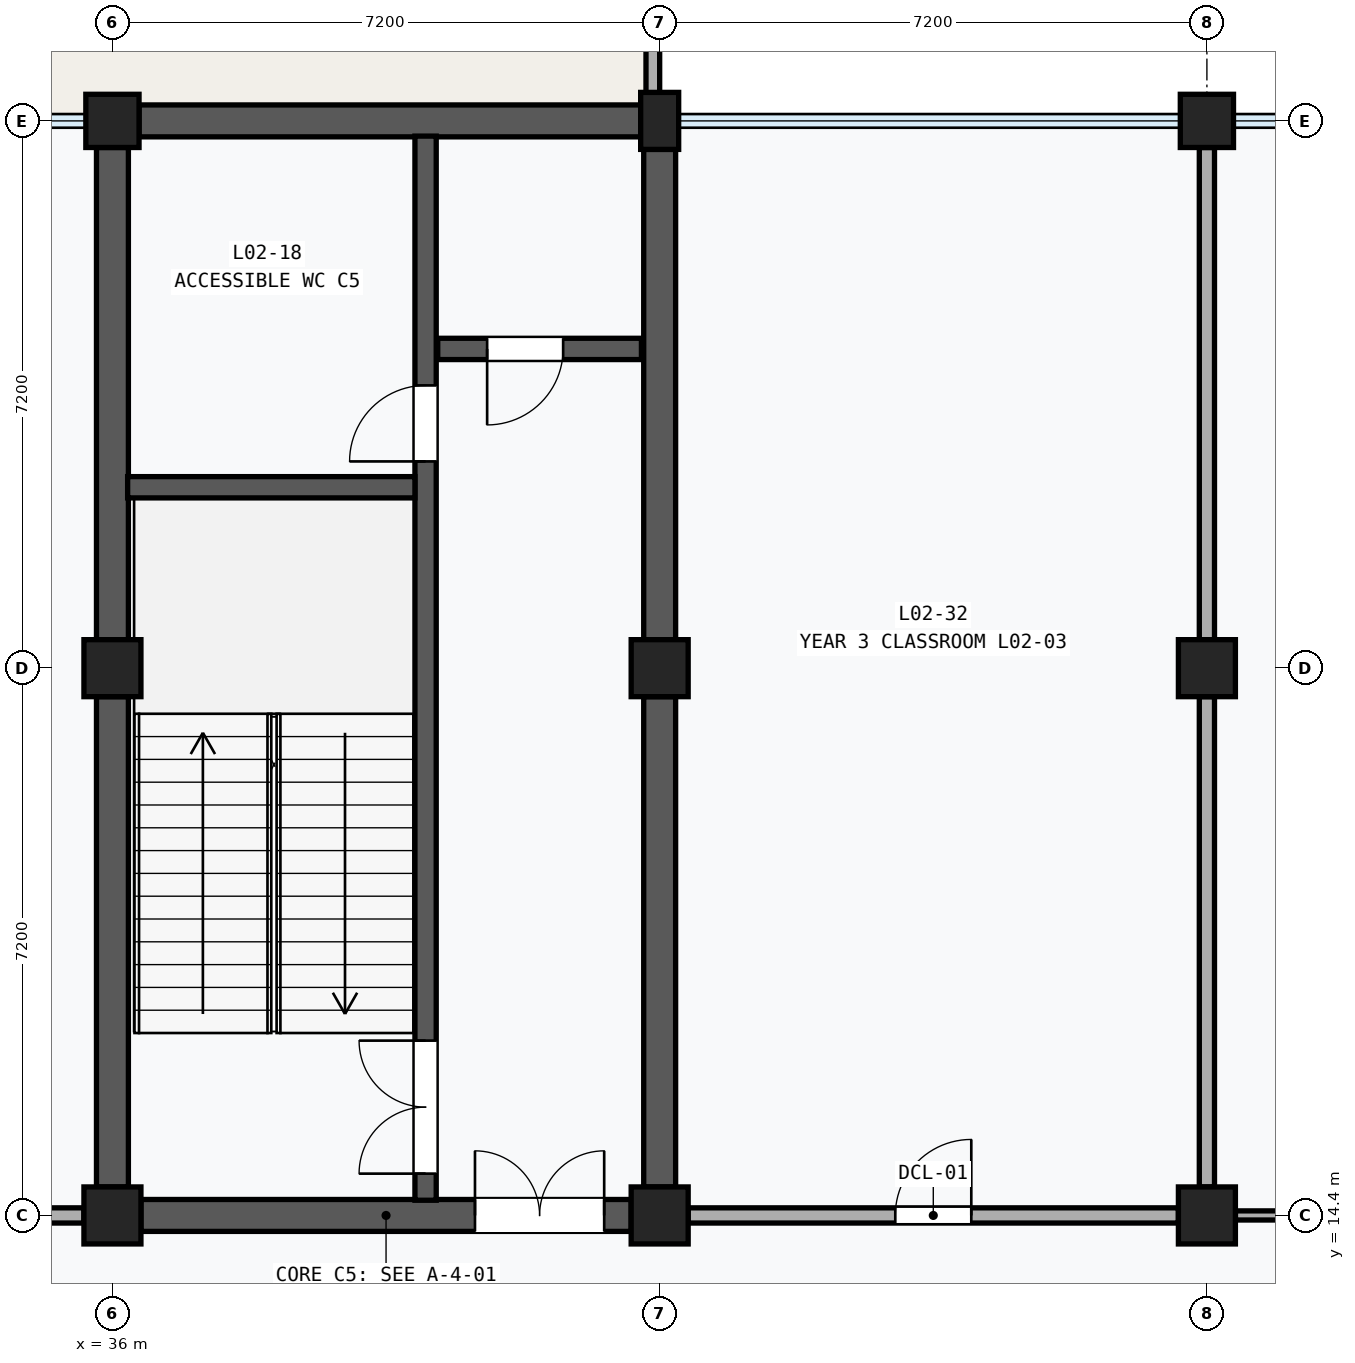
"""IFC4 building model, lengths in metres.
Left out: names, types, materials, properties, quantities, classifications, styles, units other than length and angle.
Written with IfcOpenShell. Run it as: python <this file> out.ifc"""

import sys

from ifc_helpers import new_model, si_unit, direction, frame, frame_2d, origin, origin_2d, place, context, subcontext, project, spatial, rectangle, extrude, element, fill, save


model = new_model("IFC4")
c1 = context("Model", 3, precision=1e-05, world=origin(), true_north=direction((0.0, 1.0)))
c2 = subcontext(c1, "Body", "Model", "MODEL_VIEW")
j1 = project(units=[si_unit("LENGTHUNIT", "METRE"), si_unit("PLANEANGLEUNIT", "RADIAN")], contexts=[c1])
p1 = place(None, origin())
s1 = spatial("IfcSite", under=j1, at=p1, CompositionType="ELEMENT")
p2 = place(p1, origin())
s2 = spatial("IfcBuilding", under=s1, at=p2, CompositionType="ELEMENT")
p3 = place(p2, frame((0.0, 0.0, 9.6)))
s3 = spatial("IfcBuildingStorey", under=s2, at=p3, CompositionType="ELEMENT", Elevation=9.6)
for number, where, z_axis, x_axis in (
    (1, (36.0, 14.4, 0.0), (0.0, 0.0, 1.0), (1.0, 0.0, 0.0)),
    (2, (36.0, 21.6, 0.0), (0.0, 0.0, 1.0), (1.0, 0.0, 0.0)),
):
    element("IfcColumn", number, at=place(p3, frame(where, z_axis=z_axis, x_axis=x_axis)), inside=s3, PredefinedType="COLUMN", context=c2, shape_type="SweptSolid", body=[
        extrude(rectangle(XDim=0.75, YDim=0.75, at=origin_2d()), origin(), (0.0, 0.0, 1.0), 4.8),
    ])
p4 = place(p3, frame((36.0, 28.8, 0.0), z_axis=(0.0, 0.0, 1.0), x_axis=(1.0, 0.0, 0.0)))
e3 = element("IfcColumn", 3, at=p4, inside=s3, PredefinedType="COLUMN", context=c2, shape_type="SweptSolid", body=[
    extrude(rectangle(XDim=0.7, YDim=0.7, at=origin_2d()), origin(), (0.0, 0.0, 1.0), 4.8),
])
for number, where, z_axis, x_axis in (
    (4, (43.2, 14.4, 0.0), (0.0, 0.0, 1.0), (1.0, 0.0, 0.0)),
    (5, (43.2, 21.6, 0.0), (0.0, 0.0, 1.0), (1.0, 0.0, 0.0)),
):
    element("IfcColumn", number, at=place(p3, frame(where, z_axis=z_axis, x_axis=x_axis)), inside=s3, PredefinedType="COLUMN", context=c2, shape_type="SweptSolid", body=[
        extrude(rectangle(XDim=0.75, YDim=0.75, at=origin_2d()), origin(), (0.0, 0.0, 1.0), 4.8),
    ])
p5 = place(p3, frame((43.2, 28.8, 0.0), z_axis=(0.0, 0.0, 1.0), x_axis=(1.0, 0.0, 0.0)))
e6 = element("IfcColumn", 6, at=p5, inside=s3, PredefinedType="PILASTER", context=c2, shape_type="SweptSolid", body=[
    extrude(rectangle(XDim=0.5, YDim=0.75, at=origin_2d()), origin(), (0.0, 0.0, 1.0), 4.8),
])
for number, where, z_axis, x_axis in (
    (7, (50.4, 14.4, 0.0), (0.0, 0.0, 1.0), (1.0, 0.0, 0.0)),
    (8, (50.4, 21.6, 0.0), (0.0, 0.0, 1.0), (1.0, 0.0, 0.0)),
):
    element("IfcColumn", number, at=place(p3, frame(where, z_axis=z_axis, x_axis=x_axis)), inside=s3, PredefinedType="COLUMN", context=c2, shape_type="SweptSolid", body=[
        extrude(rectangle(XDim=0.75, YDim=0.75, at=origin_2d()), origin(), (0.0, 0.0, 1.0), 4.8),
    ])
p6 = place(p3, frame((50.4, 28.8, 0.0), z_axis=(0.0, 0.0, 1.0), x_axis=(1.0, 0.0, 0.0)))
e9 = element("IfcColumn", 9, at=p6, inside=s3, PredefinedType="COLUMN", context=c2, shape_type="SweptSolid", body=[
    extrude(rectangle(XDim=0.7, YDim=0.7, at=origin_2d()), origin(), (0.0, 0.0, 1.0), 4.8),
])
p7 = place(p3, frame((43.11, 28.89, 0.0), z_axis=(0.0, 0.0, 1.0), x_axis=(0.0, 1.0, 0.0)))
e10 = element("IfcWall", 10, at=p7, inside=s3, PredefinedType="PARAPET", context=c2, shape_type="SweptSolid", body=[
    extrude(rectangle(XDim=7.02, YDim=0.18, at=frame_2d((3.51, 0.0))), origin(), (0.0, 0.0, 1.0), 0.95),
])
p8 = place(p3, frame((36.0, 14.775, 0.0), z_axis=(0.0, 0.0, 1.0), x_axis=(0.0, 1.0, 0.0)))
e11 = element("IfcWall", 11, at=p8, inside=s3, PredefinedType="SHEAR", context=c2, shape_type="SweptSolid", body=[
    extrude(rectangle(XDim=6.45, YDim=0.42, at=frame_2d((3.225, 0.0))), origin(), (0.0, 0.0, 1.0), 3.74),
])
p9 = place(p3, frame((36.0, 21.975, 0.0), z_axis=(0.0, 0.0, 1.0), x_axis=(0.0, 1.0, 0.0)))
e12 = element("IfcWall", 12, at=p9, inside=s3, PredefinedType="SHEAR", context=c2, shape_type="SweptSolid", body=[
    extrude(rectangle(XDim=6.475, YDim=0.42, at=frame_2d((3.237, 0.0))), origin(), (0.0, 0.0, 1.0), 3.74),
])
p10 = place(p3, frame((43.2, 14.775, 0.0), z_axis=(0.0, 0.0, 1.0), x_axis=(0.0, 1.0, 0.0)))
e13 = element("IfcWall", 13, at=p10, inside=s3, PredefinedType="SHEAR", context=c2, shape_type="SweptSolid", body=[
    extrude(rectangle(XDim=6.45, YDim=0.42, at=frame_2d((3.225, 0.0))), origin(), (0.0, 0.0, 1.0), 3.74),
])
p11 = place(p3, frame((43.2, 21.975, 0.0), z_axis=(0.0, 0.0, 1.0), x_axis=(0.0, 1.0, 0.0)))
e14 = element("IfcWall", 14, at=p11, inside=s3, PredefinedType="SHEAR", context=c2, shape_type="SweptSolid", body=[
    extrude(rectangle(XDim=6.45, YDim=0.42, at=frame_2d((3.225, 0.0))), origin(), (0.0, 0.0, 1.0), 3.74),
])
p12 = place(p3, frame((36.375, 14.4, 0.0), z_axis=(0.0, 0.0, 1.0), x_axis=(1.0, 0.0, 0.0)))
e15 = element("IfcWall", 15, at=p12, inside=s3, PredefinedType="SHEAR", context=c2, shape_type="SweptSolid", body=[
    extrude(rectangle(XDim=6.45, YDim=0.42, at=frame_2d((3.225, 0.0))), origin(), (0.0, 0.0, 1.0), 3.74),
])
p13 = place(p12, frame((4.395, 0.0, 0.0)))
e16 = element("IfcOpeningElement", 16, at=p13, cuts=e15, PredefinedType="OPENING", context=c2, shape_type="SweptSolid", body=[
    extrude(rectangle(XDim=1.7, YDim=2.25, at=frame_2d((0.85, 1.125))), frame((0.0, 0.222, 0.0), z_axis=(0.0, -1.0, 0.0), x_axis=(1.0, 0.0, 0.0)), (0.0, 0.0, 1.0), 0.444),
])
p14 = place(p3, frame((36.35, 28.8, 0.0), z_axis=(0.0, 0.0, 1.0), x_axis=(1.0, 0.0, 0.0)))
e17 = element("IfcWall", 17, at=p14, inside=s3, PredefinedType="SHEAR", context=c2, shape_type="SweptSolid", body=[
    extrude(rectangle(XDim=6.6, YDim=0.42, at=frame_2d((3.3, 0.0))), origin(), (0.0, 0.0, 1.0), 3.88),
])
p15 = place(p3, frame((40.12, 14.6, 0.0), z_axis=(0.0, 0.0, 1.0), x_axis=(0.0, 1.0, 0.0)))
e18 = element("IfcWall", 18, at=p15, inside=s3, PredefinedType="SHEAR", context=c2, shape_type="SweptSolid", body=[
    extrude(rectangle(XDim=14.0, YDim=0.28, at=frame_2d((7.0, 0.0))), origin(), (0.0, 0.0, 1.0), 4.51),
])
p16 = place(p15, frame((0.35, 0.0, 0.0)))
e19 = element("IfcOpeningElement", 19, at=p16, cuts=e18, PredefinedType="OPENING", context=c2, shape_type="SweptSolid", body=[
    extrude(rectangle(XDim=1.75, YDim=2.15, at=frame_2d((0.875, 1.075))), frame((0.0, 0.152, 0.0), z_axis=(0.0, -1.0, 0.0), x_axis=(1.0, 0.0, 0.0)), (0.0, 0.0, 1.0), 0.304),
])
p17 = place(p15, frame((9.72, 0.0, 0.0)))
e20 = element("IfcOpeningElement", 20, at=p17, cuts=e18, PredefinedType="OPENING", context=c2, shape_type="SweptSolid", body=[
    extrude(rectangle(XDim=1.0, YDim=2.15, at=frame_2d((0.5, 1.075))), frame((0.0, 0.152, 0.0), z_axis=(0.0, -1.0, 0.0), x_axis=(1.0, 0.0, 0.0)), (0.0, 0.0, 1.0), 0.304),
])
p18 = place(p3, frame((36.2, 23.98, 0.0), z_axis=(0.0, 0.0, 1.0), x_axis=(1.0, 0.0, 0.0)))
e21 = element("IfcWall", 21, at=p18, inside=s3, PredefinedType="SHEAR", context=c2, shape_type="SweptSolid", body=[
    extrude(rectangle(XDim=3.78, YDim=0.28, at=frame_2d((1.89, 0.0))), origin(), (0.0, 0.0, 1.0), 4.51),
])
p19 = place(p3, frame((40.28, 25.8, 0.0), z_axis=(0.0, 0.0, 1.0), x_axis=(1.0, 0.0, 0.0)))
e22 = element("IfcWall", 22, at=p19, inside=s3, PredefinedType="SHEAR", context=c2, shape_type="SweptSolid", body=[
    extrude(rectangle(XDim=2.68, YDim=0.28, at=frame_2d((1.34, 0.0))), origin(), (0.0, 0.0, 1.0), 4.51),
])
p20 = place(p19, frame((0.65, 0.0, 0.0)))
e23 = element("IfcOpeningElement", 23, at=p20, cuts=e22, PredefinedType="OPENING", context=c2, shape_type="SweptSolid", body=[
    extrude(rectangle(XDim=1.0, YDim=2.15, at=frame_2d((0.5, 1.075))), frame((0.0, 0.152, 0.0), z_axis=(0.0, -1.0, 0.0), x_axis=(1.0, 0.0, 0.0)), (0.0, 0.0, 1.0), 0.304),
])
p21 = place(p3, frame((29.175, 14.4, 0.0), z_axis=(0.0, 0.0, 1.0), x_axis=(1.0, 0.0, 0.0)))
e24 = element("IfcWall", 24, at=p21, inside=s3, PredefinedType="PARTITIONING", context=c2, shape_type="SweptSolid", body=[
    extrude(rectangle(XDim=6.45, YDim=0.2, at=frame_2d((3.225, 0.0))), origin(), (0.0, 0.0, 1.0), 3.74),
])
p22 = place(p21, frame((2.585, 0.0, 0.0)))
e25 = element("IfcOpeningElement", 25, at=p22, cuts=e24, PredefinedType="OPENING", context=c2, shape_type="SweptSolid", body=[
    extrude(rectangle(XDim=1.28, YDim=2.28, at=frame_2d((0.64, 1.14))), frame((0.0, 0.112, 0.0), z_axis=(0.0, -1.0, 0.0), x_axis=(1.0, 0.0, 0.0)), (0.0, 0.0, 1.0), 0.224),
])
p23 = place(p3, frame((43.575, 14.4, 0.0), z_axis=(0.0, 0.0, 1.0), x_axis=(1.0, 0.0, 0.0)))
e26 = element("IfcWall", 26, at=p23, inside=s3, PredefinedType="PARTITIONING", context=c2, shape_type="SweptSolid", body=[
    extrude(rectangle(XDim=6.45, YDim=0.2, at=frame_2d((3.225, 0.0))), origin(), (0.0, 0.0, 1.0), 3.81),
])
p24 = place(p23, frame((2.725, 0.0, 0.0)))
e27 = element("IfcOpeningElement", 27, at=p24, cuts=e26, PredefinedType="OPENING", context=c2, shape_type="SweptSolid", body=[
    extrude(rectangle(XDim=1.0, YDim=2.1, at=frame_2d((0.5, 1.05))), frame((0.0, 0.112, 0.0), z_axis=(0.0, -1.0, 0.0), x_axis=(1.0, 0.0, 0.0)), (0.0, 0.0, 1.0), 0.224),
])
p25 = place(p3, frame((50.4, 14.775, 0.0), z_axis=(0.0, 0.0, 1.0), x_axis=(0.0, 1.0, 0.0)))
e28 = element("IfcWall", 28, at=p25, inside=s3, PredefinedType="PARTITIONING", context=c2, shape_type="SweptSolid", body=[
    extrude(rectangle(XDim=6.45, YDim=0.2, at=frame_2d((3.225, 0.0))), origin(), (0.0, 0.0, 1.0), 3.74),
])
p26 = place(p3, frame((50.4, 21.975, 0.0), z_axis=(0.0, 0.0, 1.0), x_axis=(0.0, 1.0, 0.0)))
e29 = element("IfcWall", 29, at=p26, inside=s3, PredefinedType="PARTITIONING", context=c2, shape_type="SweptSolid", body=[
    extrude(rectangle(XDim=6.475, YDim=0.2, at=frame_2d((3.237, 0.0))), origin(), (0.0, 0.0, 1.0), 3.74),
])
p27 = place(p3, frame((50.775, 14.4, 0.0), z_axis=(0.0, 0.0, 1.0), x_axis=(1.0, 0.0, 0.0)))
e30 = element("IfcWall", 30, at=p27, inside=s3, PredefinedType="MOVABLE", context=c2, shape_type="SweptSolid", body=[
    extrude(rectangle(XDim=6.45, YDim=0.12, at=frame_2d((3.225, 0.0))), origin(), (0.0, 0.0, 1.0), 3.74),
])
p28 = place(p27, frame((2.715, 0.0, 0.0)))
e31 = element("IfcOpeningElement", 31, at=p28, cuts=e30, PredefinedType="OPENING", context=c2, shape_type="SweptSolid", body=[
    extrude(rectangle(XDim=1.02, YDim=2.12, at=frame_2d((0.51, 1.06))), frame((0.0, 0.072, 0.0), z_axis=(0.0, -1.0, 0.0), x_axis=(1.0, 0.0, 0.0)), (0.0, 0.0, 1.0), 0.144),
])
p29 = place(p13, origin())
e32 = element("IfcDoor", 32, at=p29, inside=s3, OperationType="DOUBLE_DOOR_SINGLE_SWING", PredefinedType="DOOR", context=c2, shape_type="SweptSolid", body=[
    extrude(rectangle(XDim=1.7, YDim=2.25, at=frame_2d((0.85, 1.125))), frame((0.0, 0.025, 0.0), z_axis=(0.0, -1.0, 0.0), x_axis=(1.0, 0.0, 0.0)), (0.0, 0.0, 1.0), 0.05),
])
fill(e16, e32)
p30 = place(p16, origin())
e33 = element("IfcDoor", 33, at=p30, inside=s3, OperationType="DOUBLE_DOOR_SINGLE_SWING", PredefinedType="DOOR", context=c2, shape_type="SweptSolid", body=[
    extrude(rectangle(XDim=1.75, YDim=2.15, at=frame_2d((0.875, 1.075))), frame((0.0, 0.025, 0.0), z_axis=(0.0, -1.0, 0.0), x_axis=(1.0, 0.0, 0.0)), (0.0, 0.0, 1.0), 0.05),
])
fill(e19, e33)
p31 = place(p17, origin())
e34 = element("IfcDoor", 34, at=p31, inside=s3, OperationType="SINGLE_SWING_LEFT", PredefinedType="DOOR", context=c2, shape_type="SweptSolid", body=[
    extrude(rectangle(XDim=1.0, YDim=2.15, at=frame_2d((0.5, 1.075))), frame((0.0, 0.025, 0.0), z_axis=(0.0, -1.0, 0.0), x_axis=(1.0, 0.0, 0.0)), (0.0, 0.0, 1.0), 0.05),
])
fill(e20, e34)
p32 = place(p20, frame((1.0, 0.0, 0.0), z_axis=(0.0, 0.0, 1.0), x_axis=(-1.0, 0.0, 0.0)))
e35 = element("IfcDoor", 35, at=p32, inside=s3, OperationType="SINGLE_SWING_RIGHT", PredefinedType="DOOR", context=c2, shape_type="SweptSolid", body=[
    extrude(rectangle(XDim=1.0, YDim=2.15, at=frame_2d((0.5, 1.075))), frame((0.0, 0.025, 0.0), z_axis=(0.0, -1.0, 0.0), x_axis=(1.0, 0.0, 0.0)), (0.0, 0.0, 1.0), 0.05),
])
fill(e23, e35)
p33 = place(p24, origin())
e36 = element("IfcDoor", 36, at=p33, inside=s3, OperationType="SINGLE_SWING_RIGHT", PredefinedType="DOOR", context=c2, shape_type="SweptSolid", body=[
    extrude(rectangle(XDim=1.0, YDim=2.1, at=frame_2d((0.5, 1.05))), frame((0.0, 0.025, 0.0), z_axis=(0.0, -1.0, 0.0), x_axis=(1.0, 0.0, 0.0)), (0.0, 0.0, 1.0), 0.05),
])
fill(e27, e36)
save(model, sys.argv[1])
